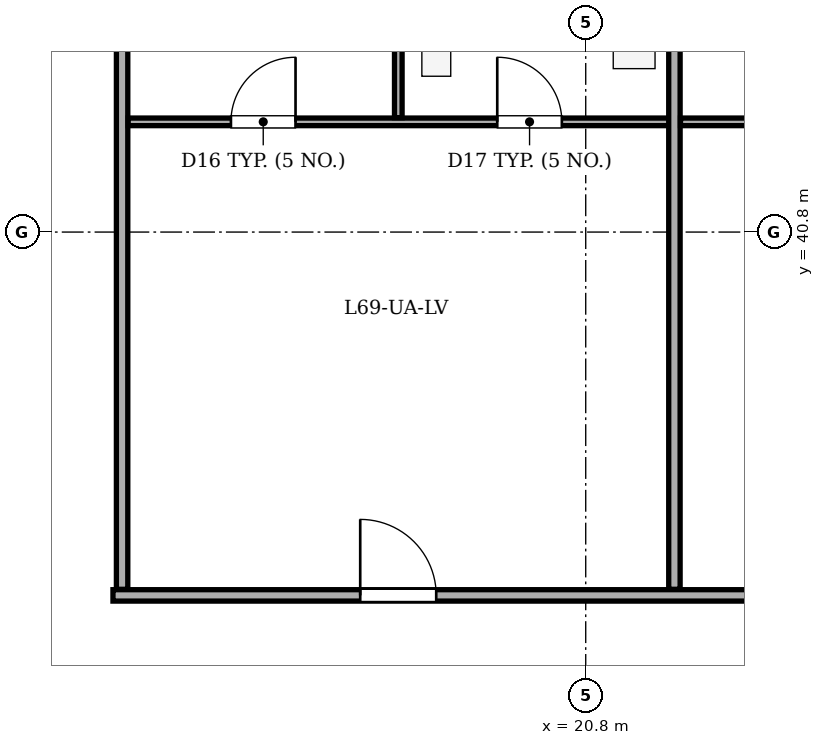
"""IFC4 building model, lengths in metres.
Left out: names, types, materials, properties, quantities, classifications, styles, units other than length and angle.
Written with IfcOpenShell. Run it as: python <this file> out.ifc"""

import sys

from ifc_helpers import new_model, si_unit, direction, frame, frame_2d, origin, place, context, subcontext, project, spatial, rectangle, extrude, element, fill, save


model = new_model("IFC4")
c1 = context("Model", 3, precision=1e-05, world=origin(), true_north=direction((0.0, 1.0)))
c2 = subcontext(c1, "Body", "Model", "MODEL_VIEW")
j1 = project(units=[si_unit("LENGTHUNIT", "METRE"), si_unit("PLANEANGLEUNIT", "RADIAN")], contexts=[c1])
p1 = place(None, origin())
s1 = spatial("IfcSite", under=j1, at=p1, CompositionType="ELEMENT")
p2 = place(p1, origin())
s2 = spatial("IfcBuilding", under=s1, at=p2, CompositionType="ELEMENT")
p3 = place(p2, frame((0.0, 0.0, 261.9)))
s3 = spatial("IfcBuildingStorey", under=s2, at=p3, CompositionType="ELEMENT", Elevation=261.9)
p4 = place(p3, frame((10.88, 41.1, 0.0), z_axis=(0.0, 0.0, 1.0), x_axis=(0.70712937715, 0.707084184501, 0.0)))
e1 = element("IfcWall", 1, at=p4, inside=s3, PredefinedType="STANDARD", context=c2, shape_type="SweptSolid", body=[
    extrude(rectangle(XDim=5.402, YDim=0.32, at=frame_2d((2.701, 0.0))), origin(), (0.0, 0.0, 1.0), 2.725),
])
p5 = place(p4, frame((2.001, 0.0, 0.75)))
e2 = element("IfcOpeningElement", 2, at=p5, cuts=e1, PredefinedType="OPENING", context=c2, shape_type="SweptSolid", body=[
    extrude(rectangle(XDim=1.4, YDim=1.65, at=frame_2d((0.7, 0.825))), frame((0.0, 0.17, 0.0), z_axis=(0.0, -1.0, 0.0), x_axis=(1.0, 0.0, 0.0)), (0.0, 0.0, 1.0), 0.34),
])
p6 = place(p3, frame((14.58, 36.02, 0.0), z_axis=(0.0, 0.0, 1.0), x_axis=(1.0, 0.0, 0.0)))
e3 = element("IfcWall", 3, at=p6, inside=s3, PredefinedType="PARTITIONING", context=c2, shape_type="SweptSolid", body=[
    extrude(rectangle(XDim=30.52, YDim=0.15, at=frame_2d((15.26, 0.0))), origin(), (0.0, 0.0, 1.0), 3.1),
])
p7 = place(p6, frame((3.253, 0.0, 0.0)))
e4 = element("IfcOpeningElement", 4, at=p7, cuts=e3, PredefinedType="OPENING", context=c2, shape_type="SweptSolid", body=[
    extrude(rectangle(XDim=1.0, YDim=2.1, at=frame_2d((0.5, 1.05))), frame((0.0, 0.085, 0.0), z_axis=(0.0, -1.0, 0.0), x_axis=(1.0, 0.0, 0.0)), (0.0, 0.0, 1.0), 0.17),
])
p8 = place(p6, frame((10.823, 0.0, 0.0)))
e5 = element("IfcOpeningElement", 5, at=p8, cuts=e3, PredefinedType="OPENING", context=c2, shape_type="SweptSolid", body=[
    extrude(rectangle(XDim=1.0, YDim=2.1, at=frame_2d((0.5, 1.05))), frame((0.0, 0.085, 0.0), z_axis=(0.0, -1.0, 0.0), x_axis=(1.0, 0.0, 0.0)), (0.0, 0.0, 1.0), 0.17),
])
p9 = place(p6, frame((18.697, 0.0, 0.0)))
e6 = element("IfcOpeningElement", 6, at=p9, cuts=e3, PredefinedType="OPENING", context=c2, shape_type="SweptSolid", body=[
    extrude(rectangle(XDim=1.0, YDim=2.1, at=frame_2d((0.5, 1.05))), frame((0.0, 0.085, 0.0), z_axis=(0.0, -1.0, 0.0), x_axis=(1.0, 0.0, 0.0)), (0.0, 0.0, 1.0), 0.17),
])
p10 = place(p6, frame((26.267, 0.0, 0.0)))
e7 = element("IfcOpeningElement", 7, at=p10, cuts=e3, PredefinedType="OPENING", context=c2, shape_type="SweptSolid", body=[
    extrude(rectangle(XDim=1.0, YDim=2.1, at=frame_2d((0.5, 1.05))), frame((0.0, 0.085, 0.0), z_axis=(0.0, -1.0, 0.0), x_axis=(1.0, 0.0, 0.0)), (0.0, 0.0, 1.0), 0.17),
])
p11 = place(p3, frame((14.7, 36.1, 0.0), z_axis=(0.0, 0.0, 1.0), x_axis=(0.0, 1.0, 0.0)))
e8 = element("IfcWall", 8, at=p11, inside=s3, PredefinedType="PARTITIONING", context=c2, shape_type="SweptSolid", body=[
    extrude(rectangle(XDim=8.655, YDim=0.15, at=frame_2d((4.327, 0.0))), origin(), (0.0, 0.0, 1.0), 3.1),
])
p12 = place(p3, frame((14.78, 42.25, 0.0), z_axis=(0.0, 0.0, 1.0), x_axis=(1.0, 0.0, 0.0)))
e9 = element("IfcWall", 9, at=p12, inside=s3, PredefinedType="PARTITIONING", context=c2, shape_type="SweptSolid", body=[
    extrude(rectangle(XDim=7.227, YDim=0.1, at=frame_2d((3.614, 0.0))), origin(), (0.0, 0.0, 1.0), 3.1),
])
p13 = place(p12, frame((1.352, 0.0, 0.0)))
e10 = element("IfcOpeningElement", 10, at=p13, cuts=e9, PredefinedType="OPENING", context=c2, shape_type="SweptSolid", body=[
    extrude(rectangle(XDim=0.85, YDim=2.05, at=frame_2d((0.425, 1.025))), frame((0.0, 0.06, 0.0), z_axis=(0.0, -1.0, 0.0), x_axis=(1.0, 0.0, 0.0)), (0.0, 0.0, 1.0), 0.12),
])
p14 = place(p12, frame((4.856, 0.0, 0.0)))
e11 = element("IfcOpeningElement", 11, at=p14, cuts=e9, PredefinedType="OPENING", context=c2, shape_type="SweptSolid", body=[
    extrude(rectangle(XDim=0.85, YDim=2.05, at=frame_2d((0.425, 1.025))), frame((0.0, 0.06, 0.0), z_axis=(0.0, -1.0, 0.0), x_axis=(1.0, 0.0, 0.0)), (0.0, 0.0, 1.0), 0.12),
])
p15 = place(p3, frame((18.334, 42.305, 0.0), z_axis=(0.0, 0.0, 1.0), x_axis=(0.0, 1.0, 0.0)))
e12 = element("IfcWall", 12, at=p15, inside=s3, PredefinedType="PARTITIONING", context=c2, shape_type="SweptSolid", body=[
    extrude(rectangle(XDim=2.45, YDim=0.1, at=frame_2d((1.225, 0.0))), origin(), (0.0, 0.0, 1.0), 3.1),
])
p16 = place(p3, frame((21.967, 36.1, 0.0), z_axis=(0.0, 0.0, 1.0), x_axis=(0.0, 1.0, 0.0)))
e13 = element("IfcWall", 13, at=p16, inside=s3, PredefinedType="PARTITIONING", context=c2, shape_type="SweptSolid", body=[
    extrude(rectangle(XDim=8.655, YDim=0.15, at=frame_2d((4.327, 0.0))), origin(), (0.0, 0.0, 1.0), 3.1),
])
p17 = place(p3, frame((22.047, 42.25, 0.0), z_axis=(0.0, 0.0, 1.0), x_axis=(1.0, 0.0, 0.0)))
e14 = element("IfcWall", 14, at=p17, inside=s3, PredefinedType="PARTITIONING", context=c2, shape_type="SweptSolid", body=[
    extrude(rectangle(XDim=7.833, YDim=0.1, at=frame_2d((3.917, 0.0))), origin(), (0.0, 0.0, 1.0), 3.1),
])
p18 = place(p17, frame((1.503, 0.0, 0.0)))
e15 = element("IfcOpeningElement", 15, at=p18, cuts=e14, PredefinedType="OPENING", context=c2, shape_type="SweptSolid", body=[
    extrude(rectangle(XDim=0.85, YDim=2.05, at=frame_2d((0.425, 1.025))), frame((0.0, 0.06, 0.0), z_axis=(0.0, -1.0, 0.0), x_axis=(1.0, 0.0, 0.0)), (0.0, 0.0, 1.0), 0.12),
])
p19 = place(p17, frame((5.31, 0.0, 0.0)))
e16 = element("IfcOpeningElement", 16, at=p19, cuts=e14, PredefinedType="OPENING", context=c2, shape_type="SweptSolid", body=[
    extrude(rectangle(XDim=0.85, YDim=2.05, at=frame_2d((0.425, 1.025))), frame((0.0, 0.06, 0.0), z_axis=(0.0, -1.0, 0.0), x_axis=(1.0, 0.0, 0.0)), (0.0, 0.0, 1.0), 0.12),
])
p20 = place(p7, origin())
e17 = element("IfcDoor", 17, at=p20, inside=s3, OperationType="SINGLE_SWING_LEFT", PredefinedType="DOOR", context=c2, shape_type="SweptSolid", body=[
    extrude(rectangle(XDim=1.0, YDim=2.1, at=frame_2d((0.5, 1.05))), frame((0.0, 0.025, 0.0), z_axis=(0.0, -1.0, 0.0), x_axis=(1.0, 0.0, 0.0)), (0.0, 0.0, 1.0), 0.05),
])
fill(e4, e17)
p21 = place(p13, origin())
e18 = element("IfcDoor", 18, at=p21, inside=s3, OperationType="SINGLE_SWING_RIGHT", PredefinedType="DOOR", context=c2, shape_type="SweptSolid", body=[
    extrude(rectangle(XDim=0.85, YDim=2.05, at=frame_2d((0.425, 1.025))), frame((0.0, 0.025, 0.0), z_axis=(0.0, -1.0, 0.0), x_axis=(1.0, 0.0, 0.0)), (0.0, 0.0, 1.0), 0.05),
])
fill(e10, e18)
p22 = place(p14, origin())
e19 = element("IfcDoor", 19, at=p22, inside=s3, OperationType="SINGLE_SWING_LEFT", PredefinedType="DOOR", context=c2, shape_type="SweptSolid", body=[
    extrude(rectangle(XDim=0.85, YDim=2.05, at=frame_2d((0.425, 1.025))), frame((0.0, 0.025, 0.0), z_axis=(0.0, -1.0, 0.0), x_axis=(1.0, 0.0, 0.0)), (0.0, 0.0, 1.0), 0.05),
])
fill(e11, e19)
save(model, sys.argv[1])
